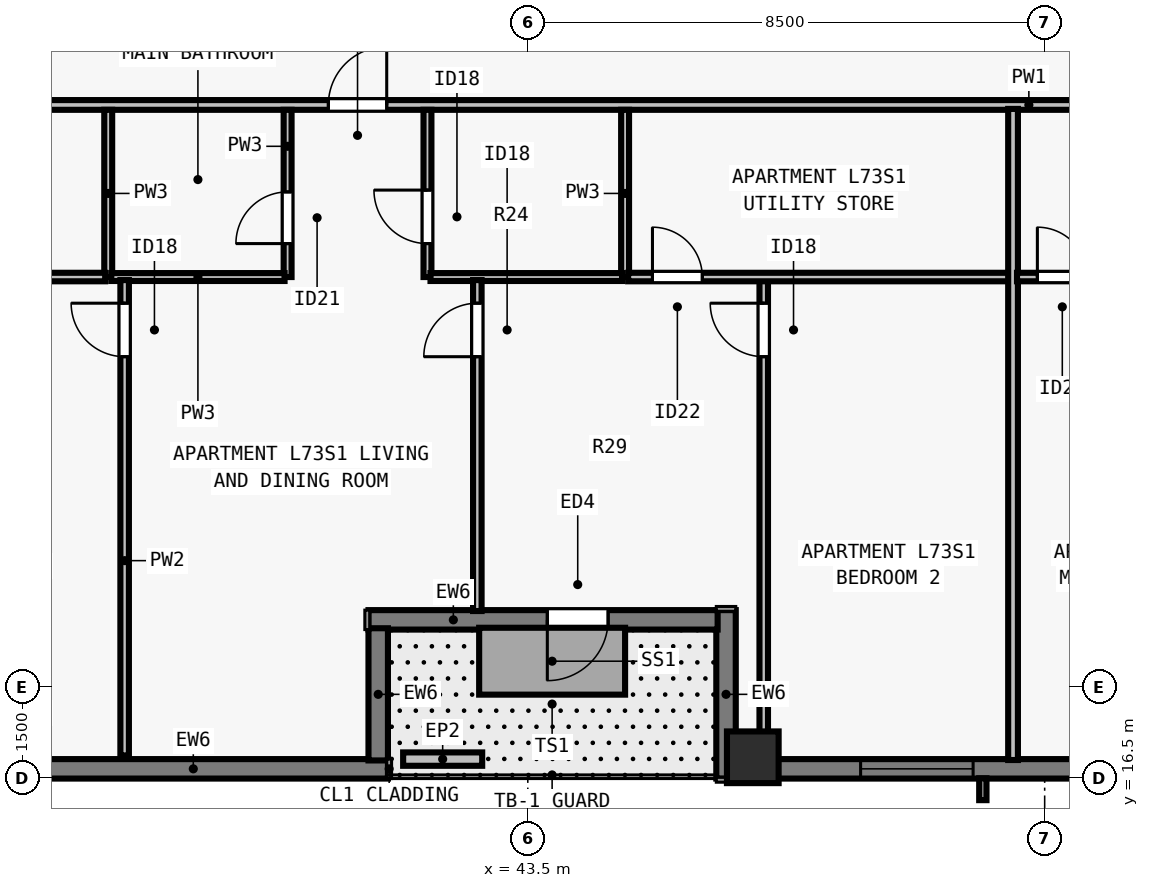
"""IFC4 building model, lengths in metres.
Left out: names, types, materials, properties, quantities, classifications, styles, units other than length and angle.
Written with IfcOpenShell. Run it as: python <this file> out.ifc"""

import sys

from ifc_helpers import new_model, si_unit, direction, frame, frame_2d, origin, origin_2d, place, context, subcontext, project, spatial, rectangle, extrude, element, fill, save


model = new_model("IFC4")
c1 = context("Model", 3, precision=1e-05, world=origin(), true_north=direction((0.0, 1.0)))
c2 = subcontext(c1, "Body", "Model", "MODEL_VIEW")
j1 = project(units=[si_unit("LENGTHUNIT", "METRE"), si_unit("PLANEANGLEUNIT", "RADIAN")], contexts=[c1])
p1 = place(None, origin())
s1 = spatial("IfcSite", under=j1, at=p1, CompositionType="ELEMENT")
p2 = place(p1, origin())
s2 = spatial("IfcBuilding", under=s1, at=p2, CompositionType="ELEMENT")
p3 = place(p2, frame((0.0, 0.0, 265.5)))
s3 = spatial("IfcBuildingStorey", under=s2, at=p3, CompositionType="ELEMENT", Elevation=265.5)
p4 = place(p3, frame((47.2, 16.85, 0.0), z_axis=(0.0, 0.0, 1.0), x_axis=(1.0, 0.0, 0.0)))
e1 = element("IfcColumn", 1, at=p4, inside=s3, PredefinedType="COLUMN", context=c2, shape_type="SweptSolid", body=[
    extrude(rectangle(XDim=0.85, YDim=0.85, at=origin_2d()), origin(), (0.0, 0.0, 1.0), 3.5),
])
p5 = place(p3, frame((41.2, 16.66, 0.0), z_axis=(0.0, 0.0, 1.0), x_axis=(-1.0, 0.0, 0.0)))
e2 = element("IfcWall", 2, at=p5, inside=s3, PredefinedType="SOLIDWALL", context=c2, shape_type="SweptSolid", body=[
    extrude(rectangle(XDim=6.402, YDim=0.32, at=frame_2d((3.201, 0.0))), origin(), (0.0, 0.0, 1.0), 3.29),
])
p6 = place(p3, frame((69.5, 16.66, 0.0), z_axis=(0.0, 0.0, 1.0), x_axis=(-1.0, 0.0, 0.0)))
e3 = element("IfcWall", 3, at=p6, inside=s3, PredefinedType="SOLIDWALL", context=c2, shape_type="SweptSolid", body=[
    extrude(rectangle(XDim=22.602, YDim=0.32, at=frame_2d((11.301, 0.0))), origin(), (0.0, 0.0, 1.0), 3.29),
])
p7 = place(p6, frame((5.525, 0.0, 0.8)))
e4 = element("IfcOpeningElement", 4, at=p7, cuts=e3, PredefinedType="OPENING", context=c2, shape_type="SweptSolid", body=[
    extrude(rectangle(XDim=1.85, YDim=1.678, at=frame_2d((0.925, 0.839))), frame((0.0, 0.17, 0.0), z_axis=(0.0, -1.0, 0.0), x_axis=(1.0, 0.0, 0.0)), (0.0, 0.0, 1.0), 0.34),
])
p8 = place(p6, frame((8.326, 0.0, 0.8)))
e5 = element("IfcOpeningElement", 5, at=p8, cuts=e3, PredefinedType="OPENING", context=c2, shape_type="SweptSolid", body=[
    extrude(rectangle(XDim=1.55, YDim=1.678, at=frame_2d((0.775, 0.839))), frame((0.0, 0.17, 0.0), z_axis=(0.0, -1.0, 0.0), x_axis=(1.0, 0.0, 0.0)), (0.0, 0.0, 1.0), 0.34),
])
p9 = place(p6, frame((15.326, 0.0, 0.8)))
e6 = element("IfcOpeningElement", 6, at=p9, cuts=e3, PredefinedType="OPENING", context=c2, shape_type="SweptSolid", body=[
    extrude(rectangle(XDim=1.55, YDim=1.678, at=frame_2d((0.775, 0.839))), frame((0.0, 0.17, 0.0), z_axis=(0.0, -1.0, 0.0), x_axis=(1.0, 0.0, 0.0)), (0.0, 0.0, 1.0), 0.34),
])
p10 = place(p6, frame((18.677, 0.0, 0.8)))
e7 = element("IfcOpeningElement", 7, at=p10, cuts=e3, PredefinedType="OPENING", context=c2, shape_type="SweptSolid", body=[
    extrude(rectangle(XDim=1.85, YDim=1.678, at=frame_2d((0.925, 0.839))), frame((0.0, 0.17, 0.0), z_axis=(0.0, -1.0, 0.0), x_axis=(1.0, 0.0, 0.0)), (0.0, 0.0, 1.0), 0.34),
])
p11 = place(p3, frame((46.76, 16.5, 0.0), z_axis=(0.0, 0.0, 1.0), x_axis=(0.0, 1.0, 0.0)))
e8 = element("IfcWall", 8, at=p11, inside=s3, PredefinedType="SOLIDWALL", context=c2, shape_type="SweptSolid", body=[
    extrude(rectangle(XDim=2.77, YDim=0.32, at=frame_2d((1.385, 0.0))), origin(), (0.0, 0.0, 1.0), 3.29),
])
p12 = place(p3, frame((46.622, 19.11, 0.0), z_axis=(0.0, 0.0, 1.0), x_axis=(-1.0, 0.0, 0.0)))
e9 = element("IfcWall", 9, at=p12, inside=s3, PredefinedType="SOLIDWALL", context=c2, shape_type="SweptSolid", body=[
    extrude(rectangle(XDim=5.742, YDim=0.32, at=frame_2d((2.871, 0.0))), origin(), (0.0, 0.0, 1.0), 3.29),
])
p13 = place(p12, frame((1.801, 0.0, 0.0)))
e10 = element("IfcOpeningElement", 10, at=p13, cuts=e9, PredefinedType="OPENING", context=c2, shape_type="SweptSolid", body=[
    extrude(rectangle(XDim=1.0, YDim=2.15, at=frame_2d((0.5, 1.075))), frame((0.0, 0.17, 0.0), z_axis=(0.0, -1.0, 0.0), x_axis=(1.0, 0.0, 0.0)), (0.0, 0.0, 1.0), 0.34),
])
p14 = place(p3, frame((41.04, 18.972, 0.0), z_axis=(0.0, 0.0, 1.0), x_axis=(0.0, -1.0, 0.0)))
e11 = element("IfcWall", 11, at=p14, inside=s3, PredefinedType="SOLIDWALL", context=c2, shape_type="SweptSolid", body=[
    extrude(rectangle(XDim=2.174, YDim=0.32, at=frame_2d((1.087, 0.0))), origin(), (0.0, 0.0, 1.0), 3.29),
])
p15 = place(p3, frame((41.45, 16.82, 0.0), z_axis=(0.0, 0.0, 1.0), x_axis=(1.0, 0.0, 0.0)))
e12 = element("IfcWall", 12, at=p15, inside=s3, PredefinedType="PARAPET", context=c2, shape_type="SweptSolid", body=[
    extrude(rectangle(XDim=1.3, YDim=0.22, at=frame_2d((0.65, 0.0))), origin(), (0.0, 0.0, 1.0), 0.55),
])
p16 = place(p3, frame((29.805, 27.577, 0.0), z_axis=(0.0, 0.0, 1.0), x_axis=(1.0, 0.0, 0.0)))
e13 = element("IfcWall", 13, at=p16, inside=s3, PredefinedType="PARTITIONING", context=c2, shape_type="SweptSolid", body=[
    extrude(rectangle(XDim=44.39, YDim=0.16, at=frame_2d((22.195, 0.0))), origin(), (0.0, 0.0, 1.0), 2.958),
])
p17 = place(p16, frame((10.415, 0.0, 0.0)))
e14 = element("IfcOpeningElement", 14, at=p17, cuts=e13, PredefinedType="OPENING", context=c2, shape_type="SweptSolid", body=[
    extrude(rectangle(XDim=0.96, YDim=2.18, at=frame_2d((0.48, 1.09))), frame((0.0, 0.09, 0.0), z_axis=(0.0, -1.0, 0.0), x_axis=(1.0, 0.0, 0.0)), (0.0, 0.0, 1.0), 0.18),
])
p18 = place(p16, frame((32.495, 0.0, 0.0)))
e15 = element("IfcOpeningElement", 15, at=p18, cuts=e13, PredefinedType="OPENING", context=c2, shape_type="SweptSolid", body=[
    extrude(rectangle(XDim=0.96, YDim=2.18, at=frame_2d((0.48, 1.09))), frame((0.0, 0.09, 0.0), z_axis=(0.0, -1.0, 0.0), x_axis=(1.0, 0.0, 0.0)), (0.0, 0.0, 1.0), 0.18),
])
p19 = place(p3, frame((36.6, 24.748, 0.0), z_axis=(0.0, 0.0, 1.0), x_axis=(0.0, 1.0, 0.0)))
e16 = element("IfcWall", 16, at=p19, inside=s3, PredefinedType="PLUMBINGWALL", context=c2, shape_type="SweptSolid", body=[
    extrude(rectangle(XDim=2.75, YDim=0.13, at=frame_2d((1.375, 0.0))), origin(), (0.0, 0.0, 1.0), 3.29),
])
p20 = place(p3, frame((39.55, 24.748, 0.0), z_axis=(0.0, 0.0, 1.0), x_axis=(0.0, 1.0, 0.0)))
e17 = element("IfcWall", 17, at=p20, inside=s3, PredefinedType="PLUMBINGWALL", context=c2, shape_type="SweptSolid", body=[
    extrude(rectangle(XDim=2.75, YDim=0.13, at=frame_2d((1.375, 0.0))), origin(), (0.0, 0.0, 1.0), 3.29),
])
p21 = place(p20, frame((0.55, 0.0, 0.0)))
e18 = element("IfcOpeningElement", 18, at=p21, cuts=e17, PredefinedType="OPENING", context=c2, shape_type="SweptSolid", body=[
    extrude(rectangle(XDim=0.85, YDim=2.08, at=frame_2d((0.425, 1.04))), frame((0.0, 0.075, 0.0), z_axis=(0.0, -1.0, 0.0), x_axis=(1.0, 0.0, 0.0)), (0.0, 0.0, 1.0), 0.15),
])
p22 = place(p3, frame((36.65, 24.748, 0.0), z_axis=(0.0, 0.0, 1.0), x_axis=(1.0, 0.0, 0.0)))
e19 = element("IfcWall", 19, at=p22, inside=s3, PredefinedType="PLUMBINGWALL", context=c2, shape_type="SweptSolid", body=[
    extrude(rectangle(XDim=2.85, YDim=0.13, at=frame_2d((1.425, 0.0))), origin(), (0.0, 0.0, 1.0), 3.29),
])
p23 = place(p3, frame((45.1, 24.748, 0.0), z_axis=(0.0, 0.0, 1.0), x_axis=(0.0, 1.0, 0.0)))
e20 = element("IfcWall", 20, at=p23, inside=s3, PredefinedType="PLUMBINGWALL", context=c2, shape_type="SweptSolid", body=[
    extrude(rectangle(XDim=2.75, YDim=0.13, at=frame_2d((1.375, 0.0))), origin(), (0.0, 0.0, 1.0), 3.29),
])
p24 = place(p3, frame((41.85, 24.748, 0.0), z_axis=(0.0, 0.0, 1.0), x_axis=(0.0, 1.0, 0.0)))
e21 = element("IfcWall", 21, at=p24, inside=s3, PredefinedType="PLUMBINGWALL", context=c2, shape_type="SweptSolid", body=[
    extrude(rectangle(XDim=2.75, YDim=0.13, at=frame_2d((1.375, 0.0))), origin(), (0.0, 0.0, 1.0), 3.29),
])
p25 = place(p24, frame((0.55, 0.0, 0.0)))
e22 = element("IfcOpeningElement", 22, at=p25, cuts=e21, PredefinedType="OPENING", context=c2, shape_type="SweptSolid", body=[
    extrude(rectangle(XDim=0.88, YDim=2.1, at=frame_2d((0.44, 1.05))), frame((0.0, 0.075, 0.0), z_axis=(0.0, -1.0, 0.0), x_axis=(1.0, 0.0, 0.0)), (0.0, 0.0, 1.0), 0.15),
])
p26 = place(p3, frame((41.9, 24.748, 0.0), z_axis=(0.0, 0.0, 1.0), x_axis=(1.0, 0.0, 0.0)))
e23 = element("IfcWall", 23, at=p26, inside=s3, PredefinedType="PLUMBINGWALL", context=c2, shape_type="SweptSolid", body=[
    extrude(rectangle(XDim=3.15, YDim=0.13, at=frame_2d((1.575, 0.0))), origin(), (0.0, 0.0, 1.0), 3.29),
])
p27 = place(p3, frame((36.87, 16.88, 0.0), z_axis=(0.0, 0.0, 1.0), x_axis=(0.0, 1.0, 0.0)))
e24 = element("IfcWall", 24, at=p27, inside=s3, PredefinedType="PARTITIONING", context=c2, shape_type="SweptSolid", body=[
    extrude(rectangle(XDim=7.818, YDim=0.14, at=frame_2d((3.909, 0.0))), origin(), (0.0, 0.0, 1.0), 2.573),
])
p28 = place(p27, frame((6.558, 0.0, 0.0)))
e25 = element("IfcOpeningElement", 25, at=p28, cuts=e24, PredefinedType="OPENING", context=c2, shape_type="SweptSolid", body=[
    extrude(rectangle(XDim=0.88, YDim=2.1, at=frame_2d((0.44, 1.05))), frame((0.0, 0.08, 0.0), z_axis=(0.0, -1.0, 0.0), x_axis=(1.0, 0.0, 0.0)), (0.0, 0.0, 1.0), 0.16),
])
p29 = place(p3, frame((29.87, 24.748, 0.0), z_axis=(0.0, 0.0, 1.0), x_axis=(1.0, 0.0, 0.0)))
e26 = element("IfcWall", 26, at=p29, inside=s3, PredefinedType="PARTITIONING", context=c2, shape_type="SweptSolid", body=[
    extrude(rectangle(XDim=6.68, YDim=0.14, at=frame_2d((3.34, 0.0))), origin(), (0.0, 0.0, 1.0), 2.958),
])
p30 = place(p29, frame((0.45, 0.0, 0.0)))
e27 = element("IfcOpeningElement", 27, at=p30, cuts=e26, PredefinedType="OPENING", context=c2, shape_type="SweptSolid", body=[
    extrude(rectangle(XDim=0.82, YDim=2.1, at=frame_2d((0.41, 1.05))), frame((0.0, 0.08, 0.0), z_axis=(0.0, -1.0, 0.0), x_axis=(1.0, 0.0, 0.0)), (0.0, 0.0, 1.0), 0.16),
])
p31 = place(p3, frame((47.38, 16.88, 0.0), z_axis=(0.0, 0.0, 1.0), x_axis=(0.0, 1.0, 0.0)))
e28 = element("IfcWall", 28, at=p31, inside=s3, PredefinedType="PARTITIONING", context=c2, shape_type="SweptSolid", body=[
    extrude(rectangle(XDim=7.908, YDim=0.14, at=frame_2d((3.954, 0.0))), origin(), (0.0, 0.0, 1.0), 2.573),
])
p32 = place(p31, frame((6.558, 0.0, 0.0)))
e29 = element("IfcOpeningElement", 29, at=p32, cuts=e28, PredefinedType="OPENING", context=c2, shape_type="SweptSolid", body=[
    extrude(rectangle(XDim=0.88, YDim=2.1, at=frame_2d((0.44, 1.05))), frame((0.0, 0.08, 0.0), z_axis=(0.0, -1.0, 0.0), x_axis=(1.0, 0.0, 0.0)), (0.0, 0.0, 1.0), 0.16),
])
p33 = place(p3, frame((45.15, 24.748, 0.0), z_axis=(0.0, 0.0, 1.0), x_axis=(1.0, 0.0, 0.0)))
e30 = element("IfcWall", 30, at=p33, inside=s3, PredefinedType="PARTITIONING", context=c2, shape_type="SweptSolid", body=[
    extrude(rectangle(XDim=6.38, YDim=0.14, at=frame_2d((3.19, 0.0))), origin(), (0.0, 0.0, 1.0), 3.29),
])
p34 = place(p33, frame((0.4, 0.0, 0.0)))
e31 = element("IfcOpeningElement", 31, at=p34, cuts=e30, PredefinedType="OPENING", context=c2, shape_type="SweptSolid", body=[
    extrude(rectangle(XDim=0.82, YDim=2.1, at=frame_2d((0.41, 1.05))), frame((0.0, 0.08, 0.0), z_axis=(0.0, -1.0, 0.0), x_axis=(1.0, 0.0, 0.0)), (0.0, 0.0, 1.0), 0.16),
])
p35 = place(p3, frame((42.67, 19.255, 0.0), z_axis=(0.0, 0.0, 1.0), x_axis=(0.0, 1.0, 0.0)))
e32 = element("IfcWall", 32, at=p35, inside=s3, PredefinedType="PARTITIONING", context=c2, shape_type="SweptSolid", body=[
    extrude(rectangle(XDim=5.443, YDim=0.14, at=frame_2d((2.721, 0.0))), origin(), (0.0, 0.0, 1.0), 3.29),
])
p36 = place(p35, frame((4.183, 0.0, 0.0)))
e33 = element("IfcOpeningElement", 33, at=p36, cuts=e32, PredefinedType="OPENING", context=c2, shape_type="SweptSolid", body=[
    extrude(rectangle(XDim=0.88, YDim=2.1, at=frame_2d((0.44, 1.05))), frame((0.0, 0.08, 0.0), z_axis=(0.0, -1.0, 0.0), x_axis=(1.0, 0.0, 0.0)), (0.0, 0.0, 1.0), 0.16),
])
p37 = place(p3, frame((51.48, 16.805, 0.0), z_axis=(0.0, 0.0, 1.0), x_axis=(0.0, 1.0, 0.0)))
e34 = element("IfcWall", 34, at=p37, inside=s3, PredefinedType="PARTITIONING", context=c2, shape_type="SweptSolid", body=[
    extrude(rectangle(XDim=10.708, YDim=0.16, at=frame_2d((5.354, 0.0))), origin(), (0.0, 0.0, 1.0), 2.958),
])
p38 = place(p3, frame((51.545, 24.748, 0.0), z_axis=(0.0, 0.0, 1.0), x_axis=(1.0, 0.0, 0.0)))
e35 = element("IfcWall", 35, at=p38, inside=s3, PredefinedType="PARTITIONING", context=c2, shape_type="SweptSolid", body=[
    extrude(rectangle(XDim=7.085, YDim=0.14, at=frame_2d((3.542, 0.0))), origin(), (0.0, 0.0, 1.0), 3.29),
])
p39 = place(p38, frame((0.335, 0.0, 0.0)))
e36 = element("IfcOpeningElement", 36, at=p39, cuts=e35, PredefinedType="OPENING", context=c2, shape_type="SweptSolid", body=[
    extrude(rectangle(XDim=0.82, YDim=2.1, at=frame_2d((0.41, 1.05))), frame((0.0, 0.08, 0.0), z_axis=(0.0, -1.0, 0.0), x_axis=(1.0, 0.0, 0.0)), (0.0, 0.0, 1.0), 0.16),
])
p40 = place(p10, origin())
e37 = element("IfcWindow", 37, at=p40, inside=s3, PartitioningType="SINGLE_PANEL", PredefinedType="WINDOW", context=c2, shape_type="SweptSolid", body=[
    extrude(rectangle(XDim=1.85, YDim=1.678, at=frame_2d((0.925, 0.839))), frame((0.0, -0.05, 0.0), z_axis=(0.0, -1.0, 0.0), x_axis=(1.0, 0.0, 0.0)), (0.0, 0.0, 1.0), 0.06),
])
fill(e7, e37)
p41 = place(p13, origin())
e38 = element("IfcDoor", 38, at=p41, inside=s3, OperationType="SINGLE_SWING_RIGHT", PredefinedType="DOOR", context=c2, shape_type="SweptSolid", body=[
    extrude(rectangle(XDim=1.0, YDim=2.15, at=frame_2d((0.5, 1.075))), frame((0.0, 0.025, 0.0), z_axis=(0.0, -1.0, 0.0), x_axis=(1.0, 0.0, 0.0)), (0.0, 0.0, 1.0), 0.05),
])
fill(e10, e38)
p42 = place(p21, origin())
e39 = element("IfcDoor", 39, at=p42, inside=s3, OperationType="SINGLE_SWING_LEFT", PredefinedType="DOOR", context=c2, shape_type="SweptSolid", body=[
    extrude(rectangle(XDim=0.85, YDim=2.08, at=frame_2d((0.425, 1.04))), frame((0.0, 0.025, 0.0), z_axis=(0.0, -1.0, 0.0), x_axis=(1.0, 0.0, 0.0)), (0.0, 0.0, 1.0), 0.05),
])
fill(e18, e39)
p43 = place(p25, origin())
e40 = element("IfcDoor", 40, at=p43, inside=s3, OperationType="SINGLE_SWING_RIGHT", PredefinedType="DOOR", context=c2, shape_type="SweptSolid", body=[
    extrude(rectangle(XDim=0.88, YDim=2.1, at=frame_2d((0.44, 1.05))), frame((0.0, 0.025, 0.0), z_axis=(0.0, -1.0, 0.0), x_axis=(1.0, 0.0, 0.0)), (0.0, 0.0, 1.0), 0.05),
])
fill(e22, e40)
p44 = place(p28, origin())
e41 = element("IfcDoor", 41, at=p44, inside=s3, OperationType="SINGLE_SWING_RIGHT", PredefinedType="DOOR", context=c2, shape_type="SweptSolid", body=[
    extrude(rectangle(XDim=0.88, YDim=2.1, at=frame_2d((0.44, 1.05))), frame((0.0, 0.025, 0.0), z_axis=(0.0, -1.0, 0.0), x_axis=(1.0, 0.0, 0.0)), (0.0, 0.0, 1.0), 0.05),
])
fill(e25, e41)
p45 = place(p34, origin())
e42 = element("IfcDoor", 42, at=p45, inside=s3, OperationType="SINGLE_SWING_LEFT", PredefinedType="DOOR", context=c2, shape_type="SweptSolid", body=[
    extrude(rectangle(XDim=0.82, YDim=2.1, at=frame_2d((0.41, 1.05))), frame((0.0, 0.025, 0.0), z_axis=(0.0, -1.0, 0.0), x_axis=(1.0, 0.0, 0.0)), (0.0, 0.0, 1.0), 0.05),
])
fill(e31, e42)
p46 = place(p32, origin())
e43 = element("IfcDoor", 43, at=p46, inside=s3, OperationType="SINGLE_SWING_RIGHT", PredefinedType="DOOR", context=c2, shape_type="SweptSolid", body=[
    extrude(rectangle(XDim=0.88, YDim=2.1, at=frame_2d((0.44, 1.05))), frame((0.0, 0.025, 0.0), z_axis=(0.0, -1.0, 0.0), x_axis=(1.0, 0.0, 0.0)), (0.0, 0.0, 1.0), 0.05),
])
fill(e29, e43)
p47 = place(p36, origin())
e44 = element("IfcDoor", 44, at=p47, inside=s3, OperationType="SINGLE_SWING_LEFT", PredefinedType="DOOR", context=c2, shape_type="SweptSolid", body=[
    extrude(rectangle(XDim=0.88, YDim=2.1, at=frame_2d((0.44, 1.05))), frame((0.0, 0.025, 0.0), z_axis=(0.0, -1.0, 0.0), x_axis=(1.0, 0.0, 0.0)), (0.0, 0.0, 1.0), 0.05),
])
fill(e33, e44)
p48 = place(p17, origin())
e45 = element("IfcDoor", 45, at=p48, inside=s3, OperationType="SINGLE_SWING_RIGHT", PredefinedType="DOOR", context=c2, shape_type="SweptSolid", body=[
    extrude(rectangle(XDim=0.96, YDim=2.18, at=frame_2d((0.48, 1.09))), frame((0.0, 0.025, 0.0), z_axis=(0.0, -1.0, 0.0), x_axis=(1.0, 0.0, 0.0)), (0.0, 0.0, 1.0), 0.05),
])
fill(e14, e45)
p49 = place(p39, origin())
e46 = element("IfcDoor", 46, at=p49, inside=s3, OperationType="SINGLE_SWING_LEFT", PredefinedType="DOOR", context=c2, shape_type="SweptSolid", body=[
    extrude(rectangle(XDim=0.82, YDim=2.1, at=frame_2d((0.41, 1.05))), frame((0.0, 0.025, 0.0), z_axis=(0.0, -1.0, 0.0), x_axis=(1.0, 0.0, 0.0)), (0.0, 0.0, 1.0), 0.05),
])
fill(e36, e46)
save(model, sys.argv[1])
